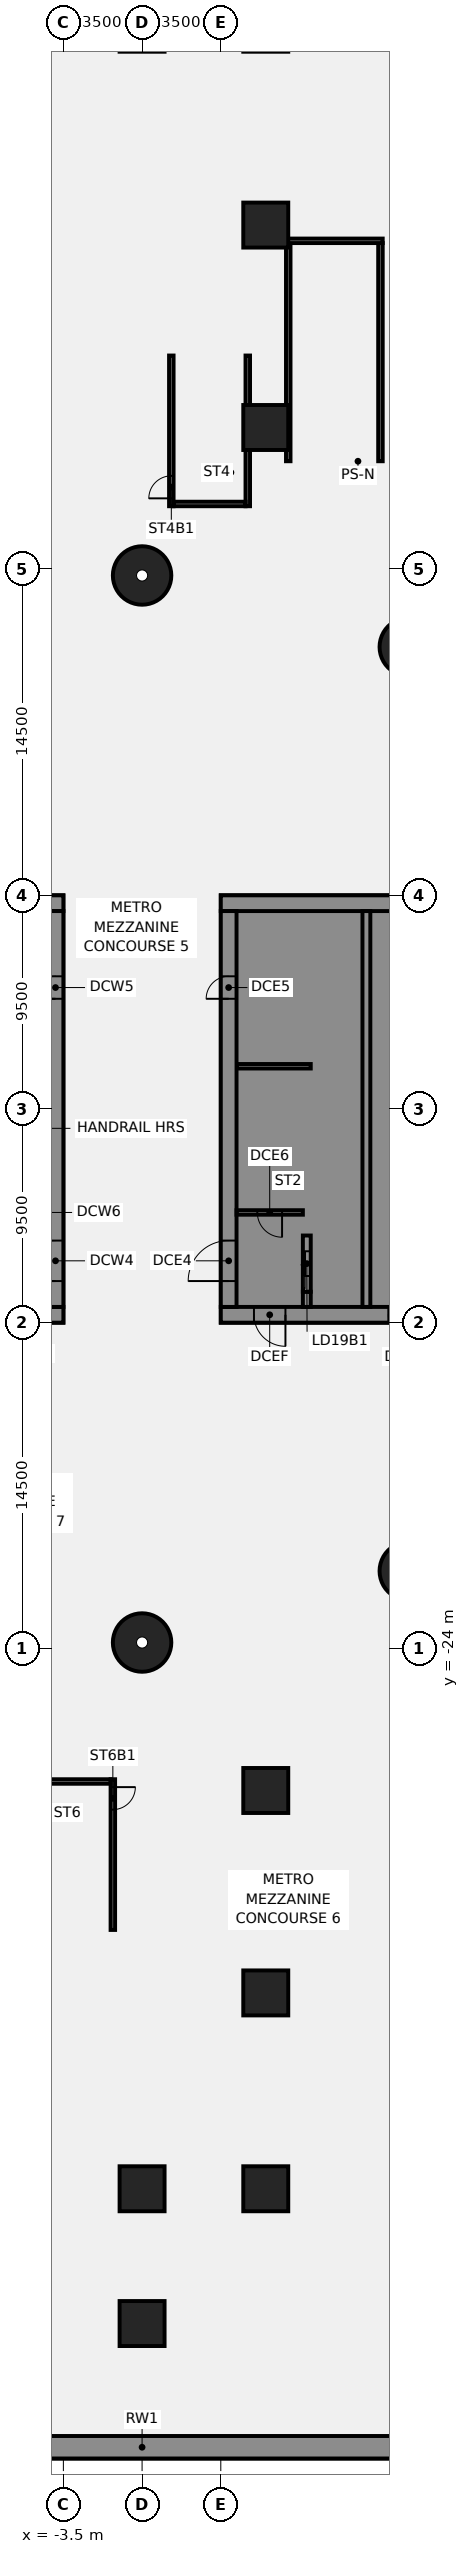
"""IFC4 building model, lengths in metres.
Left out: names, types, materials, properties, quantities, classifications, styles, units other than length and angle.
Written with IfcOpenShell. Run it as: python <this file> out.ifc"""

import sys

from ifc_helpers import new_model, si_unit, direction, frame, frame_2d, origin, origin_2d, place, context, subcontext, project, spatial, polyline, rectangle, circle, outline, extrude, element, fill, save


model = new_model("IFC4")
c1 = context("Model", 3, precision=1e-05, world=origin(), true_north=direction((0.0, 1.0)))
c2 = subcontext(c1, "Body", "Model", "MODEL_VIEW")
j1 = project(units=[si_unit("LENGTHUNIT", "METRE"), si_unit("PLANEANGLEUNIT", "RADIAN")], contexts=[c1])
p1 = place(None, origin())
s1 = spatial("IfcSite", under=j1, at=p1, CompositionType="ELEMENT")
p2 = place(p1, origin())
s2 = spatial("IfcBuilding", under=s1, at=p2, CompositionType="ELEMENT")
p3 = place(p2, frame((0.0, 0.0, -7.0)))
s3 = spatial("IfcBuildingStorey", under=s2, at=p3, CompositionType="ELEMENT", Elevation=-7.0)
p4 = place(p3, frame((63.931, -59.5, -0.45), z_axis=(0.0, 0.0, 1.0), x_axis=(-1.0, 0.0, 0.0)))
e1 = element("IfcWall", 1, at=p4, inside=s3, PredefinedType="SOLIDWALL", context=c2, shape_type="SweptSolid", body=[
    extrude(rectangle(XDim=127.863, YDim=1.0, at=frame_2d((63.931, 0.0))), origin(), (0.0, 0.0, 1.0), 6.9),
])
for number, where, z_axis, x_axis in (
    (2, (11.86, 20.543, -0.45), (0.0, 0.0, 1.0), (1.0, 0.0, 0.0)),
    (3, (0.0, 23.721, -0.45), (0.0, 0.0, 1.0), (1.0, 0.0, 0.0)),
    (4, (0.0, -23.721, -0.45), (0.0, 0.0, 1.0), (1.0, 0.0, 0.0)),
    (5, (11.86, -20.543, -0.45), (0.0, 0.0, 1.0), (1.0, 0.0, 0.0)),
):
    element("IfcColumn", number, at=place(p3, frame(where, z_axis=z_axis, x_axis=x_axis)), inside=s3, PredefinedType="COLUMN", context=c2, shape_type="SweptSolid", body=[
        extrude(circle(Radius=1.3, at=origin_2d()), origin(), (0.0, 0.0, 1.0), 6.9),
    ])
for number, where, z_axis, x_axis in (
    (6, (5.5, 39.3, -0.45), (0.0, 0.0, 1.0), (1.0, 0.0, 0.0)),
    (7, (5.5, 30.3, -0.45), (0.0, 0.0, 1.0), (1.0, 0.0, 0.0)),
    (8, (5.5, -39.3, -0.45), (0.0, 0.0, 1.0), (1.0, 0.0, 0.0)),
    (9, (5.5, -30.3, -0.45), (0.0, 0.0, 1.0), (1.0, 0.0, 0.0)),
    (10, (0.0, -48.008, -0.45), (0.0, 0.0, 1.0), (1.0, 0.0, 0.0)),
    (11, (5.5, -48.008, -0.45), (0.0, 0.0, 1.0), (1.0, 0.0, 0.0)),
    (12, (0.0, -54.0, -0.45), (0.0, 0.0, 1.0), (1.0, 0.0, 0.0)),
):
    element("IfcColumn", number, at=place(p3, frame(where, z_axis=z_axis, x_axis=x_axis)), inside=s3, PredefinedType="COLUMN", context=c2, shape_type="SweptSolid", body=[
        extrude(rectangle(XDim=2.0, YDim=2.0, at=origin_2d()), origin(), (0.0, 0.0, 1.0), 6.9),
    ])
for number, where, z_axis, x_axis in (
    (13, (10.6, 28.8, 0.0), (0.0, 0.0, 1.0), (0.0, 1.0, 0.0)),
    (14, (6.5, 28.8, 0.0), (0.0, 0.0, 1.0), (0.0, 1.0, 0.0)),
):
    element("IfcWall", number, at=place(p3, frame(where, z_axis=z_axis, x_axis=x_axis)), inside=s3, PredefinedType="SOLIDWALL", context=c2, shape_type="SweptSolid", body=[
        extrude(rectangle(XDim=9.7, YDim=0.2, at=frame_2d((4.85, 0.0))), origin(), (0.0, 0.0, 1.0), 6.45),
    ])
p5 = place(p3, frame((10.7, 38.6, 0.0), z_axis=(0.0, 0.0, 1.0), x_axis=(-1.0, 0.0, 0.0)))
e15 = element("IfcWall", 15, at=p5, inside=s3, PredefinedType="SOLIDWALL", context=c2, shape_type="SweptSolid", body=[
    extrude(rectangle(XDim=4.3, YDim=0.2, at=frame_2d((2.15, 0.0))), origin(), (0.0, 0.0, 1.0), 6.45),
])
p6 = place(p3, frame((-16.5, -9.15, 0.0), z_axis=(0.0, 0.0, 1.0), x_axis=(1.0, 0.0, 0.0)))
e16 = element("IfcWall", 16, at=p6, inside=s3, PredefinedType="SHEAR", context=c2, shape_type="SweptSolid", body=[
    extrude(rectangle(XDim=13.0, YDim=0.7, at=frame_2d((6.5, 0.0))), origin(), (0.0, 0.0, 1.0), 6.45),
])
p7 = place(p6, frame((4.15, 0.0, 0.0)))
e17 = element("IfcOpeningElement", 17, at=p7, cuts=e16, PredefinedType="OPENING", context=c2, shape_type="SweptSolid", body=[
    extrude(rectangle(XDim=1.4, YDim=2.1, at=frame_2d((0.7, 1.05))), frame((0.0, 0.36, 0.0), z_axis=(0.0, -1.0, 0.0), x_axis=(1.0, 0.0, 0.0)), (0.0, 0.0, 1.0), 0.72),
])
p8 = place(p6, frame((10.125, 0.0, 0.0)))
e18 = element("IfcOpeningElement", 18, at=p8, cuts=e16, PredefinedType="OPENING", context=c2, shape_type="SweptSolid", body=[
    extrude(rectangle(XDim=1.4, YDim=2.1, at=frame_2d((0.7, 1.05))), frame((0.0, 0.36, 0.0), z_axis=(0.0, -1.0, 0.0), x_axis=(1.0, 0.0, 0.0)), (0.0, 0.0, 1.0), 0.72),
])
p9 = place(p3, frame((-16.5, 9.15, 0.0), z_axis=(0.0, 0.0, 1.0), x_axis=(1.0, 0.0, 0.0)))
e19 = element("IfcWall", 19, at=p9, inside=s3, PredefinedType="SHEAR", context=c2, shape_type="SweptSolid", body=[
    extrude(rectangle(XDim=13.0, YDim=0.7, at=frame_2d((6.5, 0.0))), origin(), (0.0, 0.0, 1.0), 6.45),
])
p10 = place(p3, frame((-3.85, -8.8, 0.0), z_axis=(0.0, 0.0, 1.0), x_axis=(0.0, 1.0, 0.0)))
e20 = element("IfcWall", 20, at=p10, inside=s3, PredefinedType="SHEAR", context=c2, shape_type="SweptSolid", body=[
    extrude(rectangle(XDim=17.6, YDim=0.7, at=frame_2d((8.8, 0.0))), origin(), (0.0, 0.0, 1.0), 6.45),
])
p11 = place(p10, frame((1.15, 0.0, 0.0)))
e21 = element("IfcOpeningElement", 21, at=p11, cuts=e20, PredefinedType="OPENING", context=c2, shape_type="SweptSolid", body=[
    extrude(rectangle(XDim=1.8, YDim=2.1, at=frame_2d((0.9, 1.05))), frame((0.0, 0.36, 0.0), z_axis=(0.0, -1.0, 0.0), x_axis=(1.0, 0.0, 0.0)), (0.0, 0.0, 1.0), 0.72),
])
p12 = place(p10, frame((13.7, 0.0, 0.0)))
e22 = element("IfcOpeningElement", 22, at=p12, cuts=e20, PredefinedType="OPENING", context=c2, shape_type="SweptSolid", body=[
    extrude(rectangle(XDim=1.0, YDim=2.1, at=frame_2d((0.5, 1.05))), frame((0.0, 0.36, 0.0), z_axis=(0.0, -1.0, 0.0), x_axis=(1.0, 0.0, 0.0)), (0.0, 0.0, 1.0), 0.72),
])
p13 = place(p3, frame((16.5, -9.15, 0.0), z_axis=(0.0, 0.0, 1.0), x_axis=(-1.0, 0.0, 0.0)))
e23 = element("IfcWall", 23, at=p13, inside=s3, PredefinedType="SHEAR", context=c2, shape_type="SweptSolid", body=[
    extrude(rectangle(XDim=13.0, YDim=0.7, at=frame_2d((6.5, 0.0))), origin(), (0.0, 0.0, 1.0), 6.45),
])
p14 = place(p13, frame((4.15, 0.0, 0.0)))
e24 = element("IfcOpeningElement", 24, at=p14, cuts=e23, PredefinedType="OPENING", context=c2, shape_type="SweptSolid", body=[
    extrude(rectangle(XDim=1.4, YDim=2.1, at=frame_2d((0.7, 1.05))), frame((0.0, 0.36, 0.0), z_axis=(0.0, -1.0, 0.0), x_axis=(1.0, 0.0, 0.0)), (0.0, 0.0, 1.0), 0.72),
])
p15 = place(p13, frame((10.125, 0.0, 0.0)))
e25 = element("IfcOpeningElement", 25, at=p15, cuts=e23, PredefinedType="OPENING", context=c2, shape_type="SweptSolid", body=[
    extrude(rectangle(XDim=1.4, YDim=2.1, at=frame_2d((0.7, 1.05))), frame((0.0, 0.36, 0.0), z_axis=(0.0, -1.0, 0.0), x_axis=(1.0, 0.0, 0.0)), (0.0, 0.0, 1.0), 0.72),
])
p16 = place(p3, frame((16.5, 9.15, 0.0), z_axis=(0.0, 0.0, 1.0), x_axis=(-1.0, 0.0, 0.0)))
e26 = element("IfcWall", 26, at=p16, inside=s3, PredefinedType="SHEAR", context=c2, shape_type="SweptSolid", body=[
    extrude(rectangle(XDim=13.0, YDim=0.7, at=frame_2d((6.5, 0.0))), origin(), (0.0, 0.0, 1.0), 6.45),
])
p17 = place(p3, origin())
e27 = element("IfcWall", 27, at=p17, inside=s3, PredefinedType="SHEAR", context=c2, shape_type="SweptSolid", body=[
    extrude(outline(polyline([(9.8, -5.375), (7.5, -5.375), (7.5, -2.875), (9.8, -2.875), (9.8, -2.625), (7.5, -2.625), (7.5, -0.125), (9.8, -0.125), (9.8, 0.125), (7.5, 0.125), (7.5, 2.625), (9.8, 2.625), (9.8, 2.875), (7.5, 2.875), (7.5, 5.375), (9.8, 5.375), (9.8, 5.625), (7.5, 5.625), (7.5, 8.125), (9.8, 8.125), (9.8, 8.8), (7.5, 8.8), (7.15, 8.8), (7.15, -5.625), (7.5, -5.625), (9.8, -5.625), (9.8, -5.375)])), origin(), (0.0, 0.0, 1.0), 6.45),
])
p18 = place(p3, origin())
e28 = element("IfcWall", 28, at=p18, inside=s3, PredefinedType="SHEAR", context=c2, shape_type="SweptSolid", body=[
    extrude(outline(polyline([(7.5, -8.125), (7.5, -8.8), (9.8, -8.8), (9.8, -8.125), (9.8, -5.625), (9.55, -5.625), (9.55, -8.125), (7.5, -8.125)])), origin(), (0.0, 0.0, 1.0), 6.45),
])
p19 = place(p3, frame((7.325, -8.8, 0.0), z_axis=(0.0, 0.0, 1.0), x_axis=(0.0, 1.0, 0.0)))
e29 = element("IfcWall", 29, at=p19, inside=s3, PredefinedType="SHEAR", context=c2, shape_type="SweptSolid", body=[
    extrude(rectangle(XDim=0.675, YDim=0.35, at=frame_2d((0.337, 0.0))), origin(), (0.0, 0.0, 1.0), 6.45),
])
p20 = place(p3, frame((7.5, 1.9, 0.0), z_axis=(0.0, 0.0, 1.0), x_axis=(-1.0, 0.0, 0.0)))
e30 = element("IfcWall", 30, at=p20, inside=s3, PredefinedType="SHEAR", context=c2, shape_type="SweptSolid", body=[
    extrude(rectangle(XDim=3.3, YDim=0.2, at=frame_2d((1.65, 0.0))), origin(), (0.0, 0.0, 1.0), 6.45),
])
p21 = place(p3, frame((9.975, -8.8, 0.0), z_axis=(0.0, 0.0, 1.0), x_axis=(0.0, 1.0, 0.0)))
e31 = element("IfcWall", 31, at=p21, inside=s3, PredefinedType="SHEAR", context=c2, shape_type="SweptSolid", body=[
    extrude(rectangle(XDim=17.6, YDim=0.35, at=frame_2d((8.8, 0.0))), origin(), (0.0, 0.0, 1.0), 6.45),
])
p22 = place(p3, frame((7.325, -8.125, 0.0), z_axis=(0.0, 0.0, 1.0), x_axis=(0.0, 1.0, 0.0)))
e32 = element("IfcWall", 32, at=p22, inside=s3, PredefinedType="SHEAR", context=c2, shape_type="SweptSolid", body=[
    extrude(rectangle(XDim=2.5, YDim=0.35, at=frame_2d((1.25, 0.0))), origin(), (0.0, 0.0, 1.0), 6.45),
])
p23 = place(p22, frame((0.7, 0.0, 0.0)))
e33 = element("IfcOpeningElement", 33, at=p23, cuts=e32, PredefinedType="OPENING", context=c2, shape_type="SweptSolid", body=[
    extrude(rectangle(XDim=1.1, YDim=2.1, at=frame_2d((0.55, 1.05))), frame((0.0, 0.185, 0.0), z_axis=(0.0, -1.0, 0.0), x_axis=(1.0, 0.0, 0.0)), (0.0, 0.0, 1.0), 0.37),
])
p24 = place(p3, frame((3.85, -8.8, 0.0), z_axis=(0.0, 0.0, 1.0), x_axis=(0.0, 1.0, 0.0)))
e34 = element("IfcWall", 34, at=p24, inside=s3, PredefinedType="SHEAR", context=c2, shape_type="SweptSolid", body=[
    extrude(rectangle(XDim=17.6, YDim=0.7, at=frame_2d((8.8, 0.0))), origin(), (0.0, 0.0, 1.0), 6.45),
])
p25 = place(p24, frame((1.15, 0.0, 0.0)))
e35 = element("IfcOpeningElement", 35, at=p25, cuts=e34, PredefinedType="OPENING", context=c2, shape_type="SweptSolid", body=[
    extrude(rectangle(XDim=1.8, YDim=2.1, at=frame_2d((0.9, 1.05))), frame((0.0, 0.36, 0.0), z_axis=(0.0, -1.0, 0.0), x_axis=(1.0, 0.0, 0.0)), (0.0, 0.0, 1.0), 0.72),
])
p26 = place(p24, frame((13.7, 0.0, 0.0)))
e36 = element("IfcOpeningElement", 36, at=p26, cuts=e34, PredefinedType="OPENING", context=c2, shape_type="SweptSolid", body=[
    extrude(rectangle(XDim=1.0, YDim=2.1, at=frame_2d((0.5, 1.05))), frame((0.0, 0.36, 0.0), z_axis=(0.0, -1.0, 0.0), x_axis=(1.0, 0.0, 0.0)), (0.0, 0.0, 1.0), 0.72),
])
p27 = place(p3, frame((7.15, -4.6, 0.0), z_axis=(0.0, 0.0, 1.0), x_axis=(-1.0, 0.0, 0.0)))
e37 = element("IfcWall", 37, at=p27, inside=s3, PredefinedType="SHEAR", context=c2, shape_type="SweptSolid", body=[
    extrude(rectangle(XDim=2.95, YDim=0.2, at=frame_2d((1.475, 0.0))), origin(), (0.0, 0.0, 1.0), 6.45),
])
p28 = place(p27, frame((0.925, 0.0, 0.0)))
e38 = element("IfcOpeningElement", 38, at=p28, cuts=e37, PredefinedType="OPENING", context=c2, shape_type="SweptSolid", body=[
    extrude(rectangle(XDim=1.1, YDim=2.1, at=frame_2d((0.55, 1.05))), frame((0.0, 0.11, 0.0), z_axis=(0.0, -1.0, 0.0), x_axis=(1.0, 0.0, 0.0)), (0.0, 0.0, 1.0), 0.22),
])
p29 = place(p3, frame((1.3, 26.8, 0.0), z_axis=(0.0, 0.0, 1.0), x_axis=(0.0, 1.0, 0.0)))
e39 = element("IfcWall", 39, at=p29, inside=s3, PredefinedType="SHEAR", context=c2, shape_type="SweptSolid", body=[
    extrude(rectangle(XDim=6.7, YDim=0.2, at=frame_2d((3.35, 0.0))), origin(), (0.0, 0.0, 1.0), 6.45),
])
p30 = place(p29, frame((0.35, 0.0, 0.0)))
e40 = element("IfcOpeningElement", 40, at=p30, cuts=e39, PredefinedType="OPENING", context=c2, shape_type="SweptSolid", body=[
    extrude(rectangle(XDim=1.0, YDim=2.1, at=frame_2d((0.5, 1.05))), frame((0.0, 0.11, 0.0), z_axis=(0.0, -1.0, 0.0), x_axis=(1.0, 0.0, 0.0)), (0.0, 0.0, 1.0), 0.22),
])
p31 = place(p3, frame((4.7, 26.8, 0.0), z_axis=(0.0, 0.0, 1.0), x_axis=(0.0, 1.0, 0.0)))
e41 = element("IfcWall", 41, at=p31, inside=s3, PredefinedType="SHEAR", context=c2, shape_type="SweptSolid", body=[
    extrude(rectangle(XDim=6.7, YDim=0.2, at=frame_2d((3.35, 0.0))), origin(), (0.0, 0.0, 1.0), 6.45),
])
p32 = place(p3, frame((4.6, 26.9, 0.0), z_axis=(0.0, 0.0, 1.0), x_axis=(-1.0, 0.0, 0.0)))
e42 = element("IfcWall", 42, at=p32, inside=s3, PredefinedType="SHEAR", context=c2, shape_type="SweptSolid", body=[
    extrude(rectangle(XDim=3.2, YDim=0.2, at=frame_2d((1.6, 0.0))), origin(), (0.0, 0.0, 1.0), 6.45),
])
p33 = place(p3, origin())
e43 = element("IfcWall", 43, at=p33, inside=s3, PredefinedType="SHEAR", context=c2, shape_type="SweptSolid", body=[
    extrude(outline(polyline([(4.6, 33.3), (4.6, 33.5), (1.4, 33.5), (1.4, 33.3), (4.6, 33.3)])), origin(), (0.0, 0.0, 1.0), 6.45),
])
p34 = place(p3, frame((-1.3, -29.8, 0.0), z_axis=(0.0, 0.0, 1.0), x_axis=(0.0, -1.0, 0.0)))
e44 = element("IfcWall", 44, at=p34, inside=s3, PredefinedType="SHEAR", context=c2, shape_type="SweptSolid", body=[
    extrude(rectangle(XDim=6.7, YDim=0.2, at=frame_2d((3.35, 0.0))), origin(), (0.0, 0.0, 1.0), 6.45),
])
p35 = place(p34, frame((0.35, 0.0, 0.0)))
e45 = element("IfcOpeningElement", 45, at=p35, cuts=e44, PredefinedType="OPENING", context=c2, shape_type="SweptSolid", body=[
    extrude(rectangle(XDim=1.0, YDim=2.1, at=frame_2d((0.5, 1.05))), frame((0.0, 0.11, 0.0), z_axis=(0.0, -1.0, 0.0), x_axis=(1.0, 0.0, 0.0)), (0.0, 0.0, 1.0), 0.22),
])
p36 = place(p3, frame((-4.6, -29.9, 0.0), z_axis=(0.0, 0.0, 1.0), x_axis=(1.0, 0.0, 0.0)))
e46 = element("IfcWall", 46, at=p36, inside=s3, PredefinedType="SHEAR", context=c2, shape_type="SweptSolid", body=[
    extrude(rectangle(XDim=3.2, YDim=0.2, at=frame_2d((1.6, 0.0))), origin(), (0.0, 0.0, 1.0), 6.45),
])
p37 = place(p3, origin())
e47 = element("IfcWall", 47, at=p37, inside=s3, PredefinedType="SHEAR", context=c2, shape_type="SweptSolid", body=[
    extrude(outline(polyline([(-4.6, -36.3), (-4.6, -36.5), (-1.4, -36.5), (-1.4, -36.3), (-4.6, -36.3)])), origin(), (0.0, 0.0, 1.0), 6.45),
])
p38 = place(p11, origin())
e48 = element("IfcDoor", 48, at=p38, inside=s3, OperationType="SINGLE_SWING_LEFT", PredefinedType="DOOR", context=c2, shape_type="SweptSolid", body=[
    extrude(rectangle(XDim=1.8, YDim=2.1, at=frame_2d((0.9, 1.05))), frame((0.0, 0.025, 0.0), z_axis=(0.0, -1.0, 0.0), x_axis=(1.0, 0.0, 0.0)), (0.0, 0.0, 1.0), 0.05),
])
fill(e21, e48)
p39 = place(p12, origin())
e49 = element("IfcDoor", 49, at=p39, inside=s3, OperationType="SINGLE_SWING_LEFT", PredefinedType="DOOR", context=c2, shape_type="SweptSolid", body=[
    extrude(rectangle(XDim=1.0, YDim=2.1, at=frame_2d((0.5, 1.05))), frame((0.0, 0.025, 0.0), z_axis=(0.0, -1.0, 0.0), x_axis=(1.0, 0.0, 0.0)), (0.0, 0.0, 1.0), 0.05),
])
fill(e22, e49)
p40 = place(p14, origin())
e50 = element("IfcDoor", 50, at=p40, inside=s3, OperationType="SINGLE_SWING_LEFT", PredefinedType="DOOR", context=c2, shape_type="SweptSolid", body=[
    extrude(rectangle(XDim=1.4, YDim=2.1, at=frame_2d((0.7, 1.05))), frame((0.0, 0.025, 0.0), z_axis=(0.0, -1.0, 0.0), x_axis=(1.0, 0.0, 0.0)), (0.0, 0.0, 1.0), 0.05),
])
fill(e24, e50)
p41 = place(p15, origin())
e51 = element("IfcDoor", 51, at=p41, inside=s3, OperationType="SINGLE_SWING_LEFT", PredefinedType="DOOR", context=c2, shape_type="SweptSolid", body=[
    extrude(rectangle(XDim=1.4, YDim=2.1, at=frame_2d((0.7, 1.05))), frame((0.0, 0.025, 0.0), z_axis=(0.0, -1.0, 0.0), x_axis=(1.0, 0.0, 0.0)), (0.0, 0.0, 1.0), 0.05),
])
fill(e25, e51)
p42 = place(p25, origin())
e52 = element("IfcDoor", 52, at=p42, inside=s3, OperationType="SINGLE_SWING_LEFT", PredefinedType="DOOR", context=c2, shape_type="SweptSolid", body=[
    extrude(rectangle(XDim=1.8, YDim=2.1, at=frame_2d((0.9, 1.05))), frame((0.0, 0.025, 0.0), z_axis=(0.0, -1.0, 0.0), x_axis=(1.0, 0.0, 0.0)), (0.0, 0.0, 1.0), 0.05),
])
fill(e35, e52)
p43 = place(p26, origin())
e53 = element("IfcDoor", 53, at=p43, inside=s3, OperationType="SINGLE_SWING_LEFT", PredefinedType="DOOR", context=c2, shape_type="SweptSolid", body=[
    extrude(rectangle(XDim=1.0, YDim=2.1, at=frame_2d((0.5, 1.05))), frame((0.0, 0.025, 0.0), z_axis=(0.0, -1.0, 0.0), x_axis=(1.0, 0.0, 0.0)), (0.0, 0.0, 1.0), 0.05),
])
fill(e36, e53)
p44 = place(p28, origin())
e54 = element("IfcDoor", 54, at=p44, inside=s3, OperationType="SINGLE_SWING_LEFT", PredefinedType="DOOR", context=c2, shape_type="SweptSolid", body=[
    extrude(rectangle(XDim=1.1, YDim=2.1, at=frame_2d((0.55, 1.05))), frame((0.0, 0.025, 0.0), z_axis=(0.0, -1.0, 0.0), x_axis=(1.0, 0.0, 0.0)), (0.0, 0.0, 1.0), 0.05),
])
fill(e38, e54)
p45 = place(p23, origin())
e55 = element("IfcDoor", 55, at=p45, inside=s3, OperationType="SLIDING_TO_LEFT", PredefinedType="DOOR", context=c2, shape_type="SweptSolid", body=[
    extrude(rectangle(XDim=1.1, YDim=2.1, at=frame_2d((0.55, 1.05))), frame((0.0, 0.025, 0.0), z_axis=(0.0, -1.0, 0.0), x_axis=(1.0, 0.0, 0.0)), (0.0, 0.0, 1.0), 0.05),
])
fill(e33, e55)
p46 = place(p30, origin())
e56 = element("IfcDoor", 56, at=p46, inside=s3, OperationType="SINGLE_SWING_LEFT", PredefinedType="DOOR", context=c2, shape_type="SweptSolid", body=[
    extrude(rectangle(XDim=1.0, YDim=2.1, at=frame_2d((0.5, 1.05))), frame((0.0, 0.025, 0.0), z_axis=(0.0, -1.0, 0.0), x_axis=(1.0, 0.0, 0.0)), (0.0, 0.0, 1.0), 0.05),
])
fill(e40, e56)
p47 = place(p35, origin())
e57 = element("IfcDoor", 57, at=p47, inside=s3, OperationType="SINGLE_SWING_LEFT", PredefinedType="DOOR", context=c2, shape_type="SweptSolid", body=[
    extrude(rectangle(XDim=1.0, YDim=2.1, at=frame_2d((0.5, 1.05))), frame((0.0, 0.025, 0.0), z_axis=(0.0, -1.0, 0.0), x_axis=(1.0, 0.0, 0.0)), (0.0, 0.0, 1.0), 0.05),
])
fill(e45, e57)
save(model, sys.argv[1])
